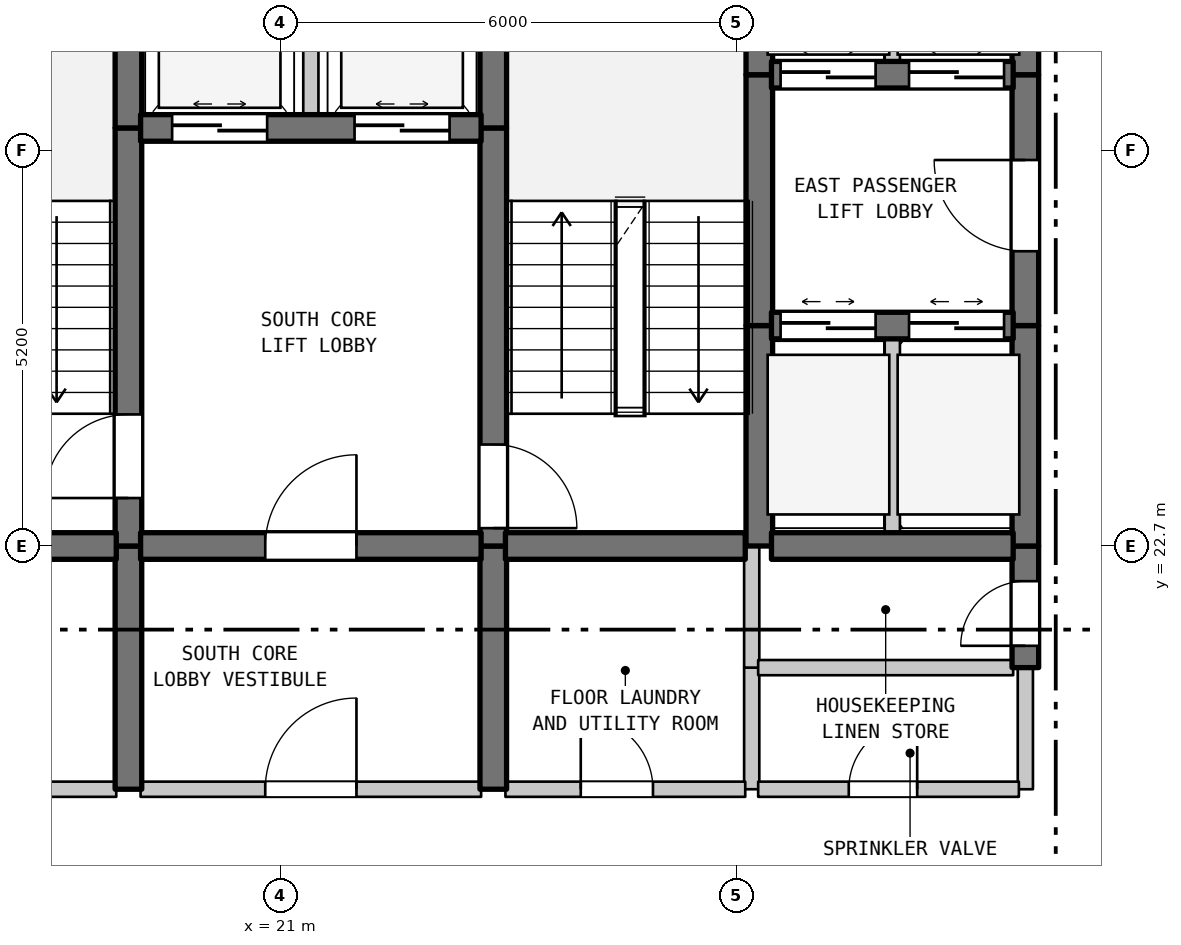
"""IFC4 building model, lengths in metres.
Left out: names, types, materials, properties, quantities, classifications, styles, units other than length and angle.
Written with IfcOpenShell. Run it as: python <this file> out.ifc"""

import sys

from ifc_helpers import new_model, si_unit, direction, frame, frame_2d, origin, place, context, subcontext, project, spatial, rectangle, extrude, element, fill, save


model = new_model("IFC4")
c1 = context("Model", 3, precision=1e-05, world=origin(), true_north=direction((0.0, 1.0)))
c2 = subcontext(c1, "Body", "Model", "MODEL_VIEW")
j1 = project(units=[si_unit("LENGTHUNIT", "METRE"), si_unit("PLANEANGLEUNIT", "RADIAN")], contexts=[c1])
p1 = place(None, origin())
s1 = spatial("IfcSite", under=j1, at=p1, CompositionType="ELEMENT")
p2 = place(p1, origin())
s2 = spatial("IfcBuilding", under=s1, at=p2, CompositionType="ELEMENT")
p3 = place(p2, frame((0.0, 0.0, 148.3)))
s3 = spatial("IfcBuildingStorey", under=s2, at=p3, CompositionType="ELEMENT", Elevation=148.3)
p4 = place(p3, frame((19.0, 19.5, 0.0), z_axis=(0.0, 0.0, 1.0), x_axis=(0.0, 1.0, 0.0)))
e1 = element("IfcWall", 1, at=p4, inside=s3, PredefinedType="SHEAR", context=c2, shape_type="SweptSolid", body=[
    extrude(rectangle(XDim=3.2, YDim=0.35, at=frame_2d((1.6, 0.0))), origin(), (0.0, 0.0, 1.0), 3.385),
])
p5 = place(p3, frame((19.0, 22.7, 0.0), z_axis=(0.0, 0.0, 1.0), x_axis=(0.0, 1.0, 0.0)))
e2 = element("IfcWall", 2, at=p5, inside=s3, PredefinedType="SHEAR", context=c2, shape_type="SweptSolid", body=[
    extrude(rectangle(XDim=5.5, YDim=0.35, at=frame_2d((2.75, 0.0))), origin(), (0.0, 0.0, 1.0), 3.385),
])
p6 = place(p5, frame((0.631, 0.0, 0.0)))
e3 = element("IfcOpeningElement", 3, at=p6, cuts=e2, PredefinedType="OPENING", context=c2, shape_type="SweptSolid", body=[
    extrude(rectangle(XDim=1.1, YDim=2.15, at=frame_2d((0.55, 1.075))), frame((0.0, 0.185, 0.0), z_axis=(0.0, -1.0, 0.0), x_axis=(1.0, 0.0, 0.0)), (0.0, 0.0, 1.0), 0.37),
])
p7 = place(p3, frame((19.0, 28.2, 0.0), z_axis=(0.0, 0.0, 1.0), x_axis=(0.0, 1.0, 0.0)))
e4 = element("IfcWall", 4, at=p7, inside=s3, PredefinedType="SHEAR", context=c2, shape_type="SweptSolid", body=[
    extrude(rectangle(XDim=1.3, YDim=0.35, at=frame_2d((0.65, 0.0))), origin(), (0.0, 0.0, 1.0), 3.385),
])
p8 = place(p3, frame((21.4, 28.2, 0.0), z_axis=(0.0, 0.0, 1.0), x_axis=(0.0, 1.0, 0.0)))
e5 = element("IfcWall", 5, at=p8, inside=s3, PredefinedType="STANDARD", context=c2, shape_type="SweptSolid", body=[
    extrude(rectangle(XDim=2.6, YDim=0.2, at=frame_2d((1.3, 0.0))), origin(), (0.0, 0.0, 1.0), 3.385),
])
p9 = place(p3, frame((23.8, 19.5, 0.0), z_axis=(0.0, 0.0, 1.0), x_axis=(0.0, 1.0, 0.0)))
e6 = element("IfcWall", 6, at=p9, inside=s3, PredefinedType="SHEAR", context=c2, shape_type="SweptSolid", body=[
    extrude(rectangle(XDim=3.2, YDim=0.35, at=frame_2d((1.6, 0.0))), origin(), (0.0, 0.0, 1.0), 3.385),
])
p10 = place(p3, frame((23.8, 22.7, 0.0), z_axis=(0.0, 0.0, 1.0), x_axis=(0.0, 1.0, 0.0)))
e7 = element("IfcWall", 7, at=p10, inside=s3, PredefinedType="SHEAR", context=c2, shape_type="SweptSolid", body=[
    extrude(rectangle(XDim=5.5, YDim=0.35, at=frame_2d((2.75, 0.0))), origin(), (0.0, 0.0, 1.0), 3.385),
])
p11 = place(p10, frame((0.235, 0.0, 0.0)))
e8 = element("IfcOpeningElement", 8, at=p11, cuts=e7, PredefinedType="OPENING", context=c2, shape_type="SweptSolid", body=[
    extrude(rectangle(XDim=1.1, YDim=2.15, at=frame_2d((0.55, 1.075))), frame((0.0, 0.185, 0.0), z_axis=(0.0, -1.0, 0.0), x_axis=(1.0, 0.0, 0.0)), (0.0, 0.0, 1.0), 0.37),
])
p12 = place(p3, frame((23.8, 28.2, 0.0), z_axis=(0.0, 0.0, 1.0), x_axis=(0.0, 1.0, 0.0)))
e9 = element("IfcWall", 9, at=p12, inside=s3, PredefinedType="SHEAR", context=c2, shape_type="SweptSolid", body=[
    extrude(rectangle(XDim=1.3, YDim=0.35, at=frame_2d((0.65, 0.0))), origin(), (0.0, 0.0, 1.0), 3.385),
])
p13 = place(p3, frame((27.2, 19.5, 0.0), z_axis=(0.0, 0.0, 1.0), x_axis=(0.0, 1.0, 0.0)))
e10 = element("IfcWall", 10, at=p13, inside=s3, PredefinedType="STANDARD", context=c2, shape_type="SweptSolid", body=[
    extrude(rectangle(XDim=1.6, YDim=0.2, at=frame_2d((0.8, 0.0))), origin(), (0.0, 0.0, 1.0), 3.385),
])
p14 = place(p3, frame((27.2, 21.1, 0.0), z_axis=(0.0, 0.0, 1.0), x_axis=(0.0, 1.0, 0.0)))
e11 = element("IfcWall", 11, at=p14, inside=s3, PredefinedType="STANDARD", context=c2, shape_type="SweptSolid", body=[
    extrude(rectangle(XDim=1.6, YDim=0.2, at=frame_2d((0.8, 0.0))), origin(), (0.0, 0.0, 1.0), 3.385),
])
p15 = place(p3, frame((27.3, 22.7, 0.0), z_axis=(0.0, 0.0, 1.0), x_axis=(0.0, 1.0, 0.0)))
e12 = element("IfcWall", 12, at=p15, inside=s3, PredefinedType="SHEAR", context=c2, shape_type="SweptSolid", body=[
    extrude(rectangle(XDim=2.9, YDim=0.35, at=frame_2d((1.45, 0.0))), origin(), (0.0, 0.0, 1.0), 3.385),
])
p16 = place(p3, frame((27.3, 25.6, 0.0), z_axis=(0.0, 0.0, 1.0), x_axis=(0.0, 1.0, 0.0)))
e13 = element("IfcWall", 13, at=p16, inside=s3, PredefinedType="SHEAR", context=c2, shape_type="SweptSolid", body=[
    extrude(rectangle(XDim=3.3, YDim=0.35, at=frame_2d((1.65, 0.0))), origin(), (0.0, 0.0, 1.0), 3.385),
])
p17 = place(p3, frame((27.3, 28.9, 0.0), z_axis=(0.0, 0.0, 1.0), x_axis=(0.0, 1.0, 0.0)))
e14 = element("IfcWall", 14, at=p17, inside=s3, PredefinedType="SHEAR", context=c2, shape_type="SweptSolid", body=[
    extrude(rectangle(XDim=0.6, YDim=0.35, at=frame_2d((0.3, 0.0))), origin(), (0.0, 0.0, 1.0), 3.385),
])
p18 = place(p3, frame((29.05, 22.7, 0.0), z_axis=(0.0, 0.0, 1.0), x_axis=(0.0, 1.0, 0.0)))
e15 = element("IfcWall", 15, at=p18, inside=s3, PredefinedType="STANDARD", context=c2, shape_type="SweptSolid", body=[
    extrude(rectangle(XDim=2.9, YDim=0.2, at=frame_2d((1.45, 0.0))), origin(), (0.0, 0.0, 1.0), 3.385),
])
p19 = place(p3, frame((29.05, 28.9, 0.0), z_axis=(0.0, 0.0, 1.0), x_axis=(0.0, 1.0, 0.0)))
e16 = element("IfcWall", 16, at=p19, inside=s3, PredefinedType="STANDARD", context=c2, shape_type="SweptSolid", body=[
    extrude(rectangle(XDim=2.6, YDim=0.2, at=frame_2d((1.3, 0.0))), origin(), (0.0, 0.0, 1.0), 3.385),
])
p20 = place(p3, frame((30.8, 19.5, 0.0), z_axis=(0.0, 0.0, 1.0), x_axis=(0.0, 1.0, 0.0)))
e17 = element("IfcWall", 17, at=p20, inside=s3, PredefinedType="STANDARD", context=c2, shape_type="SweptSolid", body=[
    extrude(rectangle(XDim=1.6, YDim=0.2, at=frame_2d((0.8, 0.0))), origin(), (0.0, 0.0, 1.0), 3.385),
])
p21 = place(p3, frame((30.8, 21.1, 0.0), z_axis=(0.0, 0.0, 1.0), x_axis=(0.0, 1.0, 0.0)))
e18 = element("IfcWall", 18, at=p21, inside=s3, PredefinedType="SHEAR", context=c2, shape_type="SweptSolid", body=[
    extrude(rectangle(XDim=1.6, YDim=0.35, at=frame_2d((0.8, 0.0))), origin(), (0.0, 0.0, 1.0), 3.385),
])
p22 = place(p21, frame((0.287, 0.0, 0.0)))
e19 = element("IfcOpeningElement", 19, at=p22, cuts=e18, PredefinedType="OPENING", context=c2, shape_type="SweptSolid", body=[
    extrude(rectangle(XDim=0.85, YDim=2.1, at=frame_2d((0.425, 1.05))), frame((0.0, 0.185, 0.0), z_axis=(0.0, -1.0, 0.0), x_axis=(1.0, 0.0, 0.0)), (0.0, 0.0, 1.0), 0.37),
])
p23 = place(p3, frame((30.8, 22.7, 0.0), z_axis=(0.0, 0.0, 1.0), x_axis=(0.0, 1.0, 0.0)))
e20 = element("IfcWall", 20, at=p23, inside=s3, PredefinedType="SHEAR", context=c2, shape_type="SweptSolid", body=[
    extrude(rectangle(XDim=2.9, YDim=0.35, at=frame_2d((1.45, 0.0))), origin(), (0.0, 0.0, 1.0), 3.385),
])
p24 = place(p3, frame((30.8, 25.6, 0.0), z_axis=(0.0, 0.0, 1.0), x_axis=(0.0, 1.0, 0.0)))
e21 = element("IfcWall", 21, at=p24, inside=s3, PredefinedType="SHEAR", context=c2, shape_type="SweptSolid", body=[
    extrude(rectangle(XDim=3.3, YDim=0.35, at=frame_2d((1.65, 0.0))), origin(), (0.0, 0.0, 1.0), 3.385),
])
p25 = place(p24, frame((0.978, 0.0, 0.0)))
e22 = element("IfcOpeningElement", 22, at=p25, cuts=e21, PredefinedType="OPENING", context=c2, shape_type="SweptSolid", body=[
    extrude(rectangle(XDim=1.2, YDim=2.2, at=frame_2d((0.6, 1.1))), frame((0.0, 0.185, 0.0), z_axis=(0.0, -1.0, 0.0), x_axis=(1.0, 0.0, 0.0)), (0.0, 0.0, 1.0), 0.37),
])
p26 = place(p3, frame((30.8, 28.9, 0.0), z_axis=(0.0, 0.0, 1.0), x_axis=(0.0, 1.0, 0.0)))
e23 = element("IfcWall", 23, at=p26, inside=s3, PredefinedType="SHEAR", context=c2, shape_type="SweptSolid", body=[
    extrude(rectangle(XDim=2.6, YDim=0.35, at=frame_2d((1.3, 0.0))), origin(), (0.0, 0.0, 1.0), 3.385),
])
p27 = place(p3, frame((15.16, 19.5, 0.0), z_axis=(0.0, 0.0, 1.0), x_axis=(1.0, 0.0, 0.0)))
e24 = element("IfcWall", 24, at=p27, inside=s3, PredefinedType="STANDARD", context=c2, shape_type="SweptSolid", body=[
    extrude(rectangle(XDim=3.68, YDim=0.2, at=frame_2d((1.84, 0.0))), origin(), (0.0, 0.0, 1.0), 3.385),
])
p28 = place(p27, frame((1.39, 0.0, 0.0)))
e25 = element("IfcOpeningElement", 25, at=p28, cuts=e24, PredefinedType="OPENING", context=c2, shape_type="SweptSolid", body=[
    extrude(rectangle(XDim=0.9, YDim=2.15, at=frame_2d((0.45, 1.075))), frame((0.0, 0.11, 0.0), z_axis=(0.0, -1.0, 0.0), x_axis=(1.0, 0.0, 0.0)), (0.0, 0.0, 1.0), 0.22),
])
p29 = place(p3, frame((19.16, 19.5, 0.0), z_axis=(0.0, 0.0, 1.0), x_axis=(1.0, 0.0, 0.0)))
e26 = element("IfcWall", 26, at=p29, inside=s3, PredefinedType="STANDARD", context=c2, shape_type="SweptSolid", body=[
    extrude(rectangle(XDim=4.48, YDim=0.2, at=frame_2d((2.24, 0.0))), origin(), (0.0, 0.0, 1.0), 3.385),
])
p30 = place(p29, frame((1.64, 0.0, 0.0)))
e27 = element("IfcOpeningElement", 27, at=p30, cuts=e26, PredefinedType="OPENING", context=c2, shape_type="SweptSolid", body=[
    extrude(rectangle(XDim=1.2, YDim=2.2, at=frame_2d((0.6, 1.1))), frame((0.0, 0.11, 0.0), z_axis=(0.0, -1.0, 0.0), x_axis=(1.0, 0.0, 0.0)), (0.0, 0.0, 1.0), 0.22),
])
p31 = place(p3, frame((23.96, 19.5, 0.0), z_axis=(0.0, 0.0, 1.0), x_axis=(1.0, 0.0, 0.0)))
e28 = element("IfcWall", 28, at=p31, inside=s3, PredefinedType="STANDARD", context=c2, shape_type="SweptSolid", body=[
    extrude(rectangle(XDim=3.155, YDim=0.2, at=frame_2d((1.578, 0.0))), origin(), (0.0, 0.0, 1.0), 3.385),
])
p32 = place(p31, frame((0.991, 0.0, 0.0)))
e29 = element("IfcOpeningElement", 29, at=p32, cuts=e28, PredefinedType="OPENING", context=c2, shape_type="SweptSolid", body=[
    extrude(rectangle(XDim=0.95, YDim=2.15, at=frame_2d((0.475, 1.075))), frame((0.0, 0.11, 0.0), z_axis=(0.0, -1.0, 0.0), x_axis=(1.0, 0.0, 0.0)), (0.0, 0.0, 1.0), 0.22),
])
p33 = place(p3, frame((27.285, 19.5, 0.0), z_axis=(0.0, 0.0, 1.0), x_axis=(1.0, 0.0, 0.0)))
e30 = element("IfcWall", 30, at=p33, inside=s3, PredefinedType="STANDARD", context=c2, shape_type="SweptSolid", body=[
    extrude(rectangle(XDim=3.43, YDim=0.2, at=frame_2d((1.715, 0.0))), origin(), (0.0, 0.0, 1.0), 3.385),
])
p34 = place(p33, frame((1.192, 0.0, 0.0)))
e31 = element("IfcOpeningElement", 31, at=p34, cuts=e30, PredefinedType="OPENING", context=c2, shape_type="SweptSolid", body=[
    extrude(rectangle(XDim=0.9, YDim=2.15, at=frame_2d((0.45, 1.075))), frame((0.0, 0.11, 0.0), z_axis=(0.0, -1.0, 0.0), x_axis=(1.0, 0.0, 0.0)), (0.0, 0.0, 1.0), 0.22),
])
p35 = place(p3, frame((27.285, 21.1, 0.0), z_axis=(0.0, 0.0, 1.0), x_axis=(1.0, 0.0, 0.0)))
e32 = element("IfcWall", 32, at=p35, inside=s3, PredefinedType="STANDARD", context=c2, shape_type="SweptSolid", body=[
    extrude(rectangle(XDim=3.355, YDim=0.2, at=frame_2d((1.677, 0.0))), origin(), (0.0, 0.0, 1.0), 3.385),
])
p36 = place(p3, frame((15.16, 22.7, 0.0), z_axis=(0.0, 0.0, 1.0), x_axis=(1.0, 0.0, 0.0)))
e33 = element("IfcWall", 33, at=p36, inside=s3, PredefinedType="SHEAR", context=c2, shape_type="SweptSolid", body=[
    extrude(rectangle(XDim=3.68, YDim=0.35, at=frame_2d((1.84, 0.0))), origin(), (0.0, 0.0, 1.0), 3.385),
])
p37 = place(p3, frame((19.16, 22.7, 0.0), z_axis=(0.0, 0.0, 1.0), x_axis=(1.0, 0.0, 0.0)))
e34 = element("IfcWall", 34, at=p37, inside=s3, PredefinedType="SHEAR", context=c2, shape_type="SweptSolid", body=[
    extrude(rectangle(XDim=4.48, YDim=0.35, at=frame_2d((2.24, 0.0))), origin(), (0.0, 0.0, 1.0), 3.385),
])
p38 = place(p37, frame((1.64, 0.0, 0.0)))
e35 = element("IfcOpeningElement", 35, at=p38, cuts=e34, PredefinedType="OPENING", context=c2, shape_type="SweptSolid", body=[
    extrude(rectangle(XDim=1.2, YDim=2.2, at=frame_2d((0.6, 1.1))), frame((0.0, 0.185, 0.0), z_axis=(0.0, -1.0, 0.0), x_axis=(1.0, 0.0, 0.0)), (0.0, 0.0, 1.0), 0.37),
])
p39 = place(p3, frame((23.96, 22.7, 0.0), z_axis=(0.0, 0.0, 1.0), x_axis=(1.0, 0.0, 0.0)))
e36 = element("IfcWall", 36, at=p39, inside=s3, PredefinedType="SHEAR", context=c2, shape_type="SweptSolid", body=[
    extrude(rectangle(XDim=3.155, YDim=0.35, at=frame_2d((1.578, 0.0))), origin(), (0.0, 0.0, 1.0), 3.385),
])
p40 = place(p3, frame((27.46, 22.7, 0.0), z_axis=(0.0, 0.0, 1.0), x_axis=(1.0, 0.0, 0.0)))
e37 = element("IfcWall", 37, at=p40, inside=s3, PredefinedType="SHEAR", context=c2, shape_type="SweptSolid", body=[
    extrude(rectangle(XDim=3.18, YDim=0.35, at=frame_2d((1.59, 0.0))), origin(), (0.0, 0.0, 1.0), 3.385),
])
p41 = place(p3, frame((27.46, 25.6, 0.0), z_axis=(0.0, 0.0, 1.0), x_axis=(1.0, 0.0, 0.0)))
e38 = element("IfcWall", 38, at=p41, inside=s3, PredefinedType="SHEAR", context=c2, shape_type="SweptSolid", body=[
    extrude(rectangle(XDim=3.18, YDim=0.35, at=frame_2d((1.59, 0.0))), origin(), (0.0, 0.0, 1.0), 3.385),
])
p42 = place(p41, frame((0.12, 0.0, 0.0)))
e39 = element("IfcOpeningElement", 39, at=p42, cuts=e38, PredefinedType="OPENING", context=c2, shape_type="SweptSolid", body=[
    extrude(rectangle(XDim=1.25, YDim=2.2, at=frame_2d((0.625, 1.1))), frame((0.0, 0.185, 0.0), z_axis=(0.0, -1.0, 0.0), x_axis=(1.0, 0.0, 0.0)), (0.0, 0.0, 1.0), 0.37),
])
p43 = place(p41, frame((1.81, 0.0, 0.0)))
e40 = element("IfcOpeningElement", 40, at=p43, cuts=e38, PredefinedType="OPENING", context=c2, shape_type="SweptSolid", body=[
    extrude(rectangle(XDim=1.25, YDim=2.2, at=frame_2d((0.625, 1.1))), frame((0.0, 0.185, 0.0), z_axis=(0.0, -1.0, 0.0), x_axis=(1.0, 0.0, 0.0)), (0.0, 0.0, 1.0), 0.37),
])
p44 = place(p3, frame((19.16, 28.2, 0.0), z_axis=(0.0, 0.0, 1.0), x_axis=(1.0, 0.0, 0.0)))
e41 = element("IfcWall", 41, at=p44, inside=s3, PredefinedType="SHEAR", context=c2, shape_type="SweptSolid", body=[
    extrude(rectangle(XDim=4.48, YDim=0.35, at=frame_2d((2.24, 0.0))), origin(), (0.0, 0.0, 1.0), 3.385),
])
p45 = place(p44, frame((0.415, 0.0, 0.0)))
e42 = element("IfcOpeningElement", 42, at=p45, cuts=e41, PredefinedType="OPENING", context=c2, shape_type="SweptSolid", body=[
    extrude(rectangle(XDim=1.25, YDim=2.2, at=frame_2d((0.625, 1.1))), frame((0.0, 0.185, 0.0), z_axis=(0.0, -1.0, 0.0), x_axis=(1.0, 0.0, 0.0)), (0.0, 0.0, 1.0), 0.37),
])
p46 = place(p44, frame((2.815, 0.0, 0.0)))
e43 = element("IfcOpeningElement", 43, at=p46, cuts=e41, PredefinedType="OPENING", context=c2, shape_type="SweptSolid", body=[
    extrude(rectangle(XDim=1.25, YDim=2.2, at=frame_2d((0.625, 1.1))), frame((0.0, 0.185, 0.0), z_axis=(0.0, -1.0, 0.0), x_axis=(1.0, 0.0, 0.0)), (0.0, 0.0, 1.0), 0.37),
])
p47 = place(p3, frame((27.46, 28.9, 0.0), z_axis=(0.0, 0.0, 1.0), x_axis=(1.0, 0.0, 0.0)))
e44 = element("IfcWall", 44, at=p47, inside=s3, PredefinedType="SHEAR", context=c2, shape_type="SweptSolid", body=[
    extrude(rectangle(XDim=3.18, YDim=0.35, at=frame_2d((1.59, 0.0))), origin(), (0.0, 0.0, 1.0), 3.385),
])
p48 = place(p47, frame((0.12, 0.0, 0.0)))
e45 = element("IfcOpeningElement", 45, at=p48, cuts=e44, PredefinedType="OPENING", context=c2, shape_type="SweptSolid", body=[
    extrude(rectangle(XDim=1.25, YDim=2.2, at=frame_2d((0.625, 1.1))), frame((0.0, 0.185, 0.0), z_axis=(0.0, -1.0, 0.0), x_axis=(1.0, 0.0, 0.0)), (0.0, 0.0, 1.0), 0.37),
])
p49 = place(p47, frame((1.81, 0.0, 0.0)))
e46 = element("IfcOpeningElement", 46, at=p49, cuts=e44, PredefinedType="OPENING", context=c2, shape_type="SweptSolid", body=[
    extrude(rectangle(XDim=1.25, YDim=2.2, at=frame_2d((0.625, 1.1))), frame((0.0, 0.185, 0.0), z_axis=(0.0, -1.0, 0.0), x_axis=(1.0, 0.0, 0.0)), (0.0, 0.0, 1.0), 0.37),
])
p50 = place(p6, origin())
e47 = element("IfcDoor", 47, at=p50, inside=s3, OperationType="SINGLE_SWING_LEFT", PredefinedType="DOOR", context=c2, shape_type="SweptSolid", body=[
    extrude(rectangle(XDim=1.1, YDim=2.15, at=frame_2d((0.55, 1.075))), frame((0.0, 0.025, 0.0), z_axis=(0.0, -1.0, 0.0), x_axis=(1.0, 0.0, 0.0)), (0.0, 0.0, 1.0), 0.05),
])
fill(e3, e47)
p51 = place(p11, frame((1.1, 0.0, 0.0), z_axis=(0.0, 0.0, 1.0), x_axis=(-1.0, 0.0, 0.0)))
e48 = element("IfcDoor", 48, at=p51, inside=s3, OperationType="SINGLE_SWING_LEFT", PredefinedType="DOOR", context=c2, shape_type="SweptSolid", body=[
    extrude(rectangle(XDim=1.1, YDim=2.15, at=frame_2d((0.55, 1.075))), frame((0.0, 0.025, 0.0), z_axis=(0.0, -1.0, 0.0), x_axis=(1.0, 0.0, 0.0)), (0.0, 0.0, 1.0), 0.05),
])
fill(e8, e48)
p52 = place(p22, origin())
e49 = element("IfcDoor", 49, at=p52, inside=s3, OperationType="SINGLE_SWING_LEFT", PredefinedType="DOOR", context=c2, shape_type="SweptSolid", body=[
    extrude(rectangle(XDim=0.85, YDim=2.1, at=frame_2d((0.425, 1.05))), frame((0.0, 0.025, 0.0), z_axis=(0.0, -1.0, 0.0), x_axis=(1.0, 0.0, 0.0)), (0.0, 0.0, 1.0), 0.05),
])
fill(e19, e49)
p53 = place(p25, origin())
e50 = element("IfcDoor", 50, at=p53, inside=s3, OperationType="SINGLE_SWING_RIGHT", PredefinedType="DOOR", context=c2, shape_type="SweptSolid", body=[
    extrude(rectangle(XDim=1.2, YDim=2.2, at=frame_2d((0.6, 1.1))), frame((0.0, 0.025, 0.0), z_axis=(0.0, -1.0, 0.0), x_axis=(1.0, 0.0, 0.0)), (0.0, 0.0, 1.0), 0.05),
])
fill(e22, e50)
p54 = place(p30, origin())
e51 = element("IfcDoor", 51, at=p54, inside=s3, OperationType="SINGLE_SWING_RIGHT", PredefinedType="DOOR", context=c2, shape_type="SweptSolid", body=[
    extrude(rectangle(XDim=1.2, YDim=2.2, at=frame_2d((0.6, 1.1))), frame((0.0, 0.025, 0.0), z_axis=(0.0, -1.0, 0.0), x_axis=(1.0, 0.0, 0.0)), (0.0, 0.0, 1.0), 0.05),
])
fill(e27, e51)
p55 = place(p32, origin())
e52 = element("IfcDoor", 52, at=p55, inside=s3, OperationType="SINGLE_SWING_LEFT", PredefinedType="DOOR", context=c2, shape_type="SweptSolid", body=[
    extrude(rectangle(XDim=0.95, YDim=2.15, at=frame_2d((0.475, 1.075))), frame((0.0, 0.025, 0.0), z_axis=(0.0, -1.0, 0.0), x_axis=(1.0, 0.0, 0.0)), (0.0, 0.0, 1.0), 0.05),
])
fill(e29, e52)
p56 = place(p34, origin())
e53 = element("IfcDoor", 53, at=p56, inside=s3, OperationType="SINGLE_SWING_RIGHT", PredefinedType="DOOR", context=c2, shape_type="SweptSolid", body=[
    extrude(rectangle(XDim=0.9, YDim=2.15, at=frame_2d((0.45, 1.075))), frame((0.0, 0.025, 0.0), z_axis=(0.0, -1.0, 0.0), x_axis=(1.0, 0.0, 0.0)), (0.0, 0.0, 1.0), 0.05),
])
fill(e31, e53)
p57 = place(p38, origin())
e54 = element("IfcDoor", 54, at=p57, inside=s3, OperationType="SINGLE_SWING_RIGHT", PredefinedType="DOOR", context=c2, shape_type="SweptSolid", body=[
    extrude(rectangle(XDim=1.2, YDim=2.2, at=frame_2d((0.6, 1.1))), frame((0.0, 0.025, 0.0), z_axis=(0.0, -1.0, 0.0), x_axis=(1.0, 0.0, 0.0)), (0.0, 0.0, 1.0), 0.05),
])
fill(e35, e54)
p58 = place(p42, origin())
e55 = element("IfcDoor", 55, at=p58, inside=s3, OperationType="DOUBLE_DOOR_SLIDING", PredefinedType="DOOR", context=c2, shape_type="SweptSolid", body=[
    extrude(rectangle(XDim=1.25, YDim=2.2, at=frame_2d((0.625, 1.1))), frame((0.0, 0.025, 0.0), z_axis=(0.0, -1.0, 0.0), x_axis=(1.0, 0.0, 0.0)), (0.0, 0.0, 1.0), 0.05),
])
fill(e39, e55)
p59 = place(p43, origin())
e56 = element("IfcDoor", 56, at=p59, inside=s3, OperationType="DOUBLE_DOOR_SLIDING", PredefinedType="DOOR", context=c2, shape_type="SweptSolid", body=[
    extrude(rectangle(XDim=1.25, YDim=2.2, at=frame_2d((0.625, 1.1))), frame((0.0, 0.025, 0.0), z_axis=(0.0, -1.0, 0.0), x_axis=(1.0, 0.0, 0.0)), (0.0, 0.0, 1.0), 0.05),
])
fill(e40, e56)
p60 = place(p45, origin())
e57 = element("IfcDoor", 57, at=p60, inside=s3, OperationType="DOUBLE_DOOR_SLIDING", PredefinedType="DOOR", context=c2, shape_type="SweptSolid", body=[
    extrude(rectangle(XDim=1.25, YDim=2.2, at=frame_2d((0.625, 1.1))), frame((0.0, 0.025, 0.0), z_axis=(0.0, -1.0, 0.0), x_axis=(1.0, 0.0, 0.0)), (0.0, 0.0, 1.0), 0.05),
])
fill(e42, e57)
p61 = place(p46, origin())
e58 = element("IfcDoor", 58, at=p61, inside=s3, OperationType="DOUBLE_DOOR_SLIDING", PredefinedType="DOOR", context=c2, shape_type="SweptSolid", body=[
    extrude(rectangle(XDim=1.25, YDim=2.2, at=frame_2d((0.625, 1.1))), frame((0.0, 0.025, 0.0), z_axis=(0.0, -1.0, 0.0), x_axis=(1.0, 0.0, 0.0)), (0.0, 0.0, 1.0), 0.05),
])
fill(e43, e58)
p62 = place(p48, origin())
e59 = element("IfcDoor", 59, at=p62, inside=s3, OperationType="DOUBLE_DOOR_SLIDING", PredefinedType="DOOR", context=c2, shape_type="SweptSolid", body=[
    extrude(rectangle(XDim=1.25, YDim=2.2, at=frame_2d((0.625, 1.1))), frame((0.0, 0.025, 0.0), z_axis=(0.0, -1.0, 0.0), x_axis=(1.0, 0.0, 0.0)), (0.0, 0.0, 1.0), 0.05),
])
fill(e45, e59)
p63 = place(p49, origin())
e60 = element("IfcDoor", 60, at=p63, inside=s3, OperationType="DOUBLE_DOOR_SLIDING", PredefinedType="DOOR", context=c2, shape_type="SweptSolid", body=[
    extrude(rectangle(XDim=1.25, YDim=2.2, at=frame_2d((0.625, 1.1))), frame((0.0, 0.025, 0.0), z_axis=(0.0, -1.0, 0.0), x_axis=(1.0, 0.0, 0.0)), (0.0, 0.0, 1.0), 0.05),
])
fill(e46, e60)
save(model, sys.argv[1])
